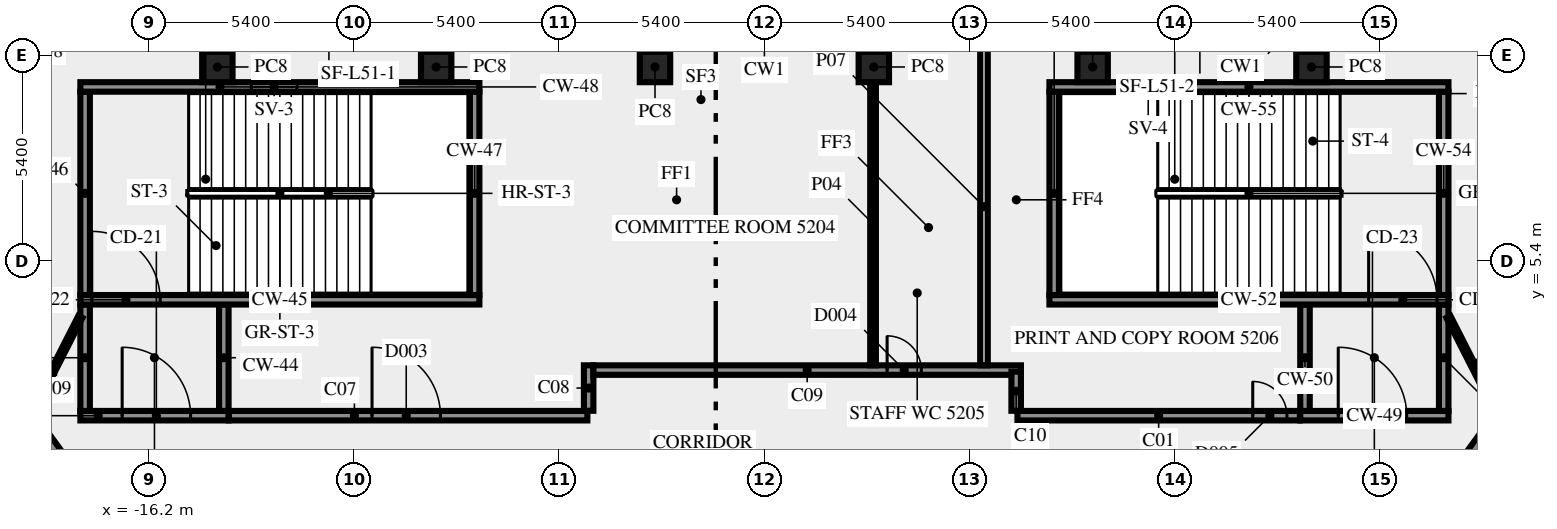
"""IFC4 building model, lengths in metres.
Left out: names, types, materials, properties, quantities, classifications, styles, units other than length and angle.
Written with IfcOpenShell. Run it as: python <this file> out.ifc"""

import sys

from ifc_helpers import new_model, si_unit, direction, frame, frame_2d, origin, origin_2d, place, context, subcontext, project, spatial, rectangle, extrude, element, fill, save


model = new_model("IFC4")
c1 = context("Model", 3, precision=1e-05, world=origin(), true_north=direction((0.0, 1.0)))
c2 = subcontext(c1, "Body", "Model", "MODEL_VIEW")
j1 = project(units=[si_unit("LENGTHUNIT", "METRE"), si_unit("PLANEANGLEUNIT", "RADIAN")], contexts=[c1])
p1 = place(None, origin())
s1 = spatial("IfcSite", under=j1, at=p1, CompositionType="ELEMENT")
p2 = place(p1, origin())
s2 = spatial("IfcBuilding", under=s1, at=p2, CompositionType="ELEMENT")
p3 = place(p2, frame((0.0, 0.0, 222.0)))
s3 = spatial("IfcBuildingStorey", under=s2, at=p3, CompositionType="ELEMENT", Elevation=222.0)
for number, where, z_axis, x_axis in (
    (1, (14.395, 10.5, 0.0), (0.0, 0.0, 1.0), (-1.0, 0.0, 0.0)),
    (2, (8.637, 10.5, 0.0), (0.0, 0.0, 1.0), (-1.0, 0.0, 0.0)),
    (3, (2.879, 10.5, 0.0), (0.0, 0.0, 1.0), (-1.0, 0.0, 0.0)),
    (4, (-2.879, 10.5, 0.0), (0.0, 0.0, 1.0), (-1.0, 0.0, 0.0)),
    (5, (-8.637, 10.5, 0.0), (0.0, 0.0, 1.0), (-1.0, 0.0, 0.0)),
    (6, (-14.395, 10.5, 0.0), (0.0, 0.0, 1.0), (-1.0, 0.0, 0.0)),
):
    element("IfcColumn", number, at=place(p3, frame(where, z_axis=z_axis, x_axis=x_axis)), inside=s3, PredefinedType="COLUMN", context=c2, shape_type="SweptSolid", body=[
        extrude(rectangle(XDim=0.8, YDim=0.8, at=origin_2d()), origin(), (0.0, 0.0, 1.0), 3.65),
    ])
p4 = place(p3, frame((-18.0, 1.325, 0.0), z_axis=(0.0, 0.0, 1.0), x_axis=(1.0, 0.0, 0.0)))
e7 = element("IfcWall", 7, at=p4, inside=s3, PredefinedType="SHEAR", context=c2, shape_type="SweptSolid", body=[
    extrude(rectangle(XDim=3.9, YDim=0.25, at=frame_2d((1.95, 0.0))), origin(), (0.0, 0.0, 1.0), 3.65),
])
p5 = place(p4, frame((1.1, 0.0, 0.0)))
e8 = element("IfcOpeningElement", 8, at=p5, cuts=e7, PredefinedType="OPENING", context=c2, shape_type="SweptSolid", body=[
    extrude(rectangle(XDim=1.8, YDim=2.1, at=frame_2d((0.9, 1.05))), frame((0.0, 0.135, 0.0), z_axis=(0.0, -1.0, 0.0), x_axis=(1.0, 0.0, 0.0)), (0.0, 0.0, 1.0), 0.27),
])
for number, where, z_axis, x_axis in (
    (9, (-17.875, 1.45, 0.0), (0.0, 0.0, 1.0), (0.0, 1.0, 0.0)),
    (10, (-14.225, 1.45, 0.0), (0.0, 0.0, 1.0), (0.0, 1.0, 0.0)),
):
    element("IfcWall", number, at=place(p3, frame(where, z_axis=z_axis, x_axis=x_axis)), inside=s3, PredefinedType="SHEAR", context=c2, shape_type="SweptSolid", body=[
        extrude(rectangle(XDim=2.8, YDim=0.25, at=frame_2d((1.4, 0.0))), origin(), (0.0, 0.0, 1.0), 3.65),
    ])
p6 = place(p3, frame((-18.0, 4.375, 0.0), z_axis=(0.0, 0.0, 1.0), x_axis=(1.0, 0.0, 0.0)))
e11 = element("IfcWall", 11, at=p6, inside=s3, PredefinedType="SHEAR", context=c2, shape_type="SweptSolid", body=[
    extrude(rectangle(XDim=10.5, YDim=0.25, at=frame_2d((5.25, 0.0))), origin(), (0.0, 0.0, 1.0), 3.65),
])
p7 = place(p6, frame((0.3, 0.0, 0.0)))
e12 = element("IfcOpeningElement", 12, at=p7, cuts=e11, PredefinedType="OPENING", context=c2, shape_type="SweptSolid", body=[
    extrude(rectangle(XDim=1.8, YDim=2.1, at=frame_2d((0.9, 1.05))), frame((0.0, 0.135, 0.0), z_axis=(0.0, -1.0, 0.0), x_axis=(1.0, 0.0, 0.0)), (0.0, 0.0, 1.0), 0.27),
])
for number, where, z_axis, x_axis in (
    (13, (-17.875, 4.5, 0.0), (0.0, 0.0, 1.0), (0.0, 1.0, 0.0)),
    (14, (-7.625, 4.5, 0.0), (0.0, 0.0, 1.0), (0.0, 1.0, 0.0)),
):
    element("IfcWall", number, at=place(p3, frame(where, z_axis=z_axis, x_axis=x_axis)), inside=s3, PredefinedType="SHEAR", context=c2, shape_type="SweptSolid", body=[
        extrude(rectangle(XDim=5.35, YDim=0.25, at=frame_2d((2.675, 0.0))), origin(), (0.0, 0.0, 1.0), 3.65),
    ])
p8 = place(p3, frame((-18.0, 9.975, 0.0), z_axis=(0.0, 0.0, 1.0), x_axis=(1.0, 0.0, 0.0)))
e15 = element("IfcWall", 15, at=p8, inside=s3, PredefinedType="SHEAR", context=c2, shape_type="SweptSolid", body=[
    extrude(rectangle(XDim=10.5, YDim=0.25, at=frame_2d((5.25, 0.0))), origin(), (0.0, 0.0, 1.0), 3.65),
])
p9 = place(p8, frame((4.5, 0.0, 1.0)))
e16 = element("IfcOpeningElement", 16, at=p9, cuts=e15, PredefinedType="OPENING", context=c2, shape_type="SweptSolid", body=[
    extrude(rectangle(XDim=1.2, YDim=1.2, at=frame_2d((0.6, 0.6))), frame((0.0, 0.135, 0.0), z_axis=(0.0, -1.0, 0.0), x_axis=(1.0, 0.0, 0.0)), (0.0, 0.0, 1.0), 0.27),
])
p10 = place(p3, frame((14.1, 1.325, 0.0), z_axis=(0.0, 0.0, 1.0), x_axis=(1.0, 0.0, 0.0)))
e17 = element("IfcWall", 17, at=p10, inside=s3, PredefinedType="SHEAR", context=c2, shape_type="SweptSolid", body=[
    extrude(rectangle(XDim=3.9, YDim=0.25, at=frame_2d((1.95, 0.0))), origin(), (0.0, 0.0, 1.0), 3.65),
])
p11 = place(p10, frame((1.0, 0.0, 0.0)))
e18 = element("IfcOpeningElement", 18, at=p11, cuts=e17, PredefinedType="OPENING", context=c2, shape_type="SweptSolid", body=[
    extrude(rectangle(XDim=1.8, YDim=2.1, at=frame_2d((0.9, 1.05))), frame((0.0, 0.135, 0.0), z_axis=(0.0, -1.0, 0.0), x_axis=(1.0, 0.0, 0.0)), (0.0, 0.0, 1.0), 0.27),
])
for number, where, z_axis, x_axis in (
    (19, (14.225, 1.45, 0.0), (0.0, 0.0, 1.0), (0.0, 1.0, 0.0)),
    (20, (17.875, 1.45, 0.0), (0.0, 0.0, 1.0), (0.0, 1.0, 0.0)),
):
    element("IfcWall", number, at=place(p3, frame(where, z_axis=z_axis, x_axis=x_axis)), inside=s3, PredefinedType="SHEAR", context=c2, shape_type="SweptSolid", body=[
        extrude(rectangle(XDim=2.8, YDim=0.25, at=frame_2d((1.4, 0.0))), origin(), (0.0, 0.0, 1.0), 3.65),
    ])
p12 = place(p3, frame((7.5, 4.375, 0.0), z_axis=(0.0, 0.0, 1.0), x_axis=(1.0, 0.0, 0.0)))
e21 = element("IfcWall", 21, at=p12, inside=s3, PredefinedType="SHEAR", context=c2, shape_type="SweptSolid", body=[
    extrude(rectangle(XDim=10.5, YDim=0.25, at=frame_2d((5.25, 0.0))), origin(), (0.0, 0.0, 1.0), 3.65),
])
p13 = place(p12, frame((8.4, 0.0, 0.0)))
e22 = element("IfcOpeningElement", 22, at=p13, cuts=e21, PredefinedType="OPENING", context=c2, shape_type="SweptSolid", body=[
    extrude(rectangle(XDim=1.8, YDim=2.1, at=frame_2d((0.9, 1.05))), frame((0.0, 0.135, 0.0), z_axis=(0.0, -1.0, 0.0), x_axis=(1.0, 0.0, 0.0)), (0.0, 0.0, 1.0), 0.27),
])
for number, where, z_axis, x_axis in (
    (23, (7.625, 4.5, 0.0), (0.0, 0.0, 1.0), (0.0, 1.0, 0.0)),
    (24, (17.875, 4.5, 0.0), (0.0, 0.0, 1.0), (0.0, 1.0, 0.0)),
):
    element("IfcWall", number, at=place(p3, frame(where, z_axis=z_axis, x_axis=x_axis)), inside=s3, PredefinedType="SHEAR", context=c2, shape_type="SweptSolid", body=[
        extrude(rectangle(XDim=5.35, YDim=0.25, at=frame_2d((2.675, 0.0))), origin(), (0.0, 0.0, 1.0), 3.65),
    ])
p14 = place(p3, frame((7.5, 9.975, 0.0), z_axis=(0.0, 0.0, 1.0), x_axis=(1.0, 0.0, 0.0)))
e25 = element("IfcWall", 25, at=p14, inside=s3, PredefinedType="SHEAR", context=c2, shape_type="SweptSolid", body=[
    extrude(rectangle(XDim=10.5, YDim=0.25, at=frame_2d((5.25, 0.0))), origin(), (0.0, 0.0, 1.0), 3.65),
])
p15 = place(p14, frame((2.0, 0.0, 1.0)))
e26 = element("IfcOpeningElement", 26, at=p15, cuts=e25, PredefinedType="OPENING", context=c2, shape_type="SweptSolid", body=[
    extrude(rectangle(XDim=1.2, YDim=1.2, at=frame_2d((0.6, 0.6))), frame((0.0, 0.135, 0.0), z_axis=(0.0, -1.0, 0.0), x_axis=(1.0, 0.0, 0.0)), (0.0, 0.0, 1.0), 0.27),
])
p16 = place(p3, frame((6.659, 1.325, 0.0), z_axis=(0.0, 0.0, 1.0), x_axis=(1.0, 0.0, 0.0)))
e27 = element("IfcWall", 27, at=p16, inside=s3, PredefinedType="SOLIDWALL", context=c2, shape_type="SweptSolid", body=[
    extrude(rectangle(XDim=7.431, YDim=0.25, at=frame_2d((3.716, 0.0))), origin(), (0.0, 0.0, 1.0), 3.65),
])
p17 = place(p16, frame((6.191, 0.0, 0.0)))
e28 = element("IfcOpeningElement", 28, at=p17, cuts=e27, PredefinedType="OPENING", context=c2, shape_type="SweptSolid", body=[
    extrude(rectangle(XDim=0.9, YDim=2.1, at=frame_2d((0.45, 1.05))), frame((0.0, 0.135, 0.0), z_axis=(0.0, -1.0, 0.0), x_axis=(1.0, 0.0, 0.0)), (0.0, 0.0, 1.0), 0.27),
])
p18 = place(p3, frame((17.545, -1.125, 0.0), z_axis=(0.0, 0.0, 1.0), x_axis=(0.587787966774, 0.809015022181, 0.0)))
e29 = element("IfcWall", 29, at=p18, inside=s3, PredefinedType="SOLIDWALL", context=c2, shape_type="SweptSolid", body=[
    extrude(rectangle(XDim=23.345, YDim=0.25, at=frame_2d((11.672, 0.0))), origin(), (0.0, 0.0, 1.0), 3.65),
])
p19 = place(p18, frame((3.441, 0.0, 0.0)))
e30 = element("IfcOpeningElement", 30, at=p19, cuts=e29, PredefinedType="OPENING", context=c2, shape_type="SweptSolid", body=[
    extrude(rectangle(XDim=0.9, YDim=2.1, at=frame_2d((0.45, 1.05))), frame((0.0, 0.135, 0.0), z_axis=(0.0, -1.0, 0.0), x_axis=(1.0, 0.0, 0.0)), (0.0, 0.0, 1.0), 0.27),
])
p20 = place(p3, frame((-31.918, 18.658, 0.0), z_axis=(0.0, 0.0, 1.0), x_axis=(0.587788731405, -0.80901446664, 0.0)))
e31 = element("IfcWall", 31, at=p20, inside=s3, PredefinedType="SOLIDWALL", context=c2, shape_type="SweptSolid", body=[
    extrude(rectangle(XDim=24.453, YDim=0.25, at=frame_2d((12.227, 0.0))), origin(), (0.0, 0.0, 1.0), 3.65),
])
p21 = place(p20, frame((8.395, 0.0, 0.0)))
e32 = element("IfcOpeningElement", 32, at=p21, cuts=e31, PredefinedType="OPENING", context=c2, shape_type="SweptSolid", body=[
    extrude(rectangle(XDim=1.0, YDim=2.1, at=frame_2d((0.5, 1.05))), frame((0.0, 0.135, 0.0), z_axis=(0.0, -1.0, 0.0), x_axis=(1.0, 0.0, 0.0)), (0.0, 0.0, 1.0), 0.27),
])
p22 = place(p20, frame((10.095, 0.0, 0.0)))
e33 = element("IfcOpeningElement", 33, at=p22, cuts=e31, PredefinedType="OPENING", context=c2, shape_type="SweptSolid", body=[
    extrude(rectangle(XDim=0.9, YDim=2.1, at=frame_2d((0.45, 1.05))), frame((0.0, 0.135, 0.0), z_axis=(0.0, -1.0, 0.0), x_axis=(1.0, 0.0, 0.0)), (0.0, 0.0, 1.0), 0.27),
])
p23 = place(p3, frame((-14.09, 1.325, 0.0), z_axis=(0.0, 0.0, 1.0), x_axis=(1.0, 0.0, 0.0)))
e34 = element("IfcWall", 34, at=p23, inside=s3, PredefinedType="SOLIDWALL", context=c2, shape_type="SweptSolid", body=[
    extrude(rectangle(XDim=9.431, YDim=0.25, at=frame_2d((4.716, 0.0))), origin(), (0.0, 0.0, 1.0), 3.65),
])
p24 = place(p23, frame((3.765, 0.0, 0.0)))
e35 = element("IfcOpeningElement", 35, at=p24, cuts=e34, PredefinedType="OPENING", context=c2, shape_type="SweptSolid", body=[
    extrude(rectangle(XDim=1.8, YDim=2.1, at=frame_2d((0.9, 1.05))), frame((0.0, 0.135, 0.0), z_axis=(0.0, -1.0, 0.0), x_axis=(1.0, 0.0, 0.0)), (0.0, 0.0, 1.0), 0.27),
])
p25 = place(p3, frame((-4.625, 1.454, 0.0), z_axis=(0.0, 0.0, 1.0), x_axis=(0.0, 1.0, 0.0)))
e36 = element("IfcWall", 36, at=p25, inside=s3, PredefinedType="SOLIDWALL", context=c2, shape_type="SweptSolid", body=[
    extrude(rectangle(XDim=1.196, YDim=0.25, at=frame_2d((0.598, 0.0))), origin(), (0.0, 0.0, 1.0), 3.65),
])
p26 = place(p3, frame((-4.5, 2.525, 0.0), z_axis=(0.0, 0.0, 1.0), x_axis=(1.0, 0.0, 0.0)))
e37 = element("IfcWall", 37, at=p26, inside=s3, PredefinedType="SOLIDWALL", context=c2, shape_type="SweptSolid", body=[
    extrude(rectangle(XDim=11.25, YDim=0.25, at=frame_2d((5.625, 0.0))), origin(), (0.0, 0.0, 1.0), 3.65),
])
p27 = place(p26, frame((7.729, 0.0, 0.0)))
e38 = element("IfcOpeningElement", 38, at=p27, cuts=e37, PredefinedType="OPENING", context=c2, shape_type="SweptSolid", body=[
    extrude(rectangle(XDim=0.9, YDim=2.1, at=frame_2d((0.45, 1.05))), frame((0.0, 0.135, 0.0), z_axis=(0.0, -1.0, 0.0), x_axis=(1.0, 0.0, 0.0)), (0.0, 0.0, 1.0), 0.27),
])
p28 = place(p3, frame((6.625, 2.484, 0.0), z_axis=(0.0, 0.0, 1.0), x_axis=(0.0, -1.0, 0.0)))
e39 = element("IfcWall", 39, at=p28, inside=s3, PredefinedType="SOLIDWALL", context=c2, shape_type="SweptSolid", body=[
    extrude(rectangle(XDim=1.03, YDim=0.25, at=frame_2d((0.515, 0.0))), origin(), (0.0, 0.0, 1.0), 3.65),
])
p29 = place(p3, frame((2.859, 2.65, 0.0), z_axis=(0.0, 0.0, 1.0), x_axis=(0.0, 1.0, 0.0)))
e40 = element("IfcWall", 40, at=p29, inside=s3, PredefinedType="PARTITIONING", context=c2, shape_type="SweptSolid", body=[
    extrude(rectangle(XDim=7.445, YDim=0.15, at=frame_2d((3.723, 0.0))), origin(), (0.0, 0.0, 1.0), 3.65),
])
p30 = place(p3, frame((-26.089, 10.848, 0.0), z_axis=(0.0, 0.0, 1.0), x_axis=(0.807661302092, 0.589646691759, 0.0)))
e41 = element("IfcWall", 41, at=p30, inside=s3, PredefinedType="PARTITIONING", context=c2, shape_type="SweptSolid", body=[
    extrude(rectangle(XDim=9.55, YDim=0.12, at=frame_2d((4.775, 0.0))), origin(), (0.0, 0.0, 1.0), 2.85),
])
p31 = place(p3, frame((5.778, 11.0, 0.0), z_axis=(0.0, 0.0, 1.0), x_axis=(0.0, -1.0, 0.0)))
e42 = element("IfcWall", 42, at=p31, inside=s3, PredefinedType="SOLIDWALL", context=c2, shape_type="SweptSolid", body=[
    extrude(rectangle(XDim=8.35, YDim=0.2, at=frame_2d((4.175, 0.0))), origin(), (0.0, 0.0, 1.0), 2.85),
])
for number, where, z_axis, x_axis in (
    (43, (18.0, 3.925, 0.0), (0.0, 0.0, 1.0), (0.454, -0.891, 0.0)),
    (44, (-19.261, 1.45, 0.0), (0.0, 0.0, 1.0), (0.454, 0.891, 0.0)),
):
    element("IfcWall", number, at=place(p3, frame(where, z_axis=z_axis, x_axis=x_axis)), inside=s3, PredefinedType="PARTITIONING", context=c2, shape_type="SweptSolid", body=[
        extrude(rectangle(XDim=2.778, YDim=0.12, at=frame_2d((1.389, 0.0))), origin(), (0.0, 0.0, 1.0), 3.65),
    ])
p32 = place(p5, origin())
e45 = element("IfcDoor", 45, at=p32, inside=s3, OperationType="DOUBLE_DOOR_SINGLE_SWING", PredefinedType="DOOR", context=c2, shape_type="SweptSolid", body=[
    extrude(rectangle(XDim=1.8, YDim=2.1, at=frame_2d((0.9, 1.05))), frame((0.0, 0.025, 0.0), z_axis=(0.0, -1.0, 0.0), x_axis=(1.0, 0.0, 0.0)), (0.0, 0.0, 1.0), 0.05),
])
fill(e8, e45)
p33 = place(p7, origin())
e46 = element("IfcDoor", 46, at=p33, inside=s3, OperationType="DOUBLE_DOOR_SINGLE_SWING", PredefinedType="DOOR", context=c2, shape_type="SweptSolid", body=[
    extrude(rectangle(XDim=1.8, YDim=2.1, at=frame_2d((0.9, 1.05))), frame((0.0, 0.025, 0.0), z_axis=(0.0, -1.0, 0.0), x_axis=(1.0, 0.0, 0.0)), (0.0, 0.0, 1.0), 0.05),
])
fill(e12, e46)
p34 = place(p9, origin())
e47 = element("IfcWindow", 47, at=p34, inside=s3, PartitioningType="SINGLE_PANEL", PredefinedType="WINDOW", context=c2, shape_type="SweptSolid", body=[
    extrude(rectangle(XDim=1.2, YDim=1.2, at=frame_2d((0.6, 0.6))), frame((0.0, 0.03, 0.0), z_axis=(0.0, -1.0, 0.0), x_axis=(1.0, 0.0, 0.0)), (0.0, 0.0, 1.0), 0.06),
])
fill(e16, e47)
p35 = place(p11, origin())
e48 = element("IfcDoor", 48, at=p35, inside=s3, OperationType="DOUBLE_DOOR_SINGLE_SWING", PredefinedType="DOOR", context=c2, shape_type="SweptSolid", body=[
    extrude(rectangle(XDim=1.8, YDim=2.1, at=frame_2d((0.9, 1.05))), frame((0.0, 0.025, 0.0), z_axis=(0.0, -1.0, 0.0), x_axis=(1.0, 0.0, 0.0)), (0.0, 0.0, 1.0), 0.05),
])
fill(e18, e48)
p36 = place(p13, origin())
e49 = element("IfcDoor", 49, at=p36, inside=s3, OperationType="DOUBLE_DOOR_SINGLE_SWING", PredefinedType="DOOR", context=c2, shape_type="SweptSolid", body=[
    extrude(rectangle(XDim=1.8, YDim=2.1, at=frame_2d((0.9, 1.05))), frame((0.0, 0.025, 0.0), z_axis=(0.0, -1.0, 0.0), x_axis=(1.0, 0.0, 0.0)), (0.0, 0.0, 1.0), 0.05),
])
fill(e22, e49)
p37 = place(p15, origin())
e50 = element("IfcWindow", 50, at=p37, inside=s3, PartitioningType="SINGLE_PANEL", PredefinedType="WINDOW", context=c2, shape_type="SweptSolid", body=[
    extrude(rectangle(XDim=1.2, YDim=1.2, at=frame_2d((0.6, 0.6))), frame((0.0, 0.03, 0.0), z_axis=(0.0, -1.0, 0.0), x_axis=(1.0, 0.0, 0.0)), (0.0, 0.0, 1.0), 0.06),
])
fill(e26, e50)
p38 = place(p24, origin())
e51 = element("IfcDoor", 51, at=p38, inside=s3, OperationType="DOUBLE_DOOR_SINGLE_SWING", PredefinedType="DOOR", context=c2, shape_type="SweptSolid", body=[
    extrude(rectangle(XDim=1.8, YDim=2.1, at=frame_2d((0.9, 1.05))), frame((0.0, 0.025, 0.0), z_axis=(0.0, -1.0, 0.0), x_axis=(1.0, 0.0, 0.0)), (0.0, 0.0, 1.0), 0.05),
])
fill(e35, e51)
p39 = place(p17, origin())
e52 = element("IfcDoor", 52, at=p39, inside=s3, OperationType="SINGLE_SWING_RIGHT", PredefinedType="DOOR", context=c2, shape_type="SweptSolid", body=[
    extrude(rectangle(XDim=0.9, YDim=2.1, at=frame_2d((0.45, 1.05))), frame((0.0, 0.025, 0.0), z_axis=(0.0, -1.0, 0.0), x_axis=(1.0, 0.0, 0.0)), (0.0, 0.0, 1.0), 0.05),
])
fill(e28, e52)
p40 = place(p27, origin())
e53 = element("IfcDoor", 53, at=p40, inside=s3, OperationType="SINGLE_SWING_LEFT", PredefinedType="DOOR", context=c2, shape_type="SweptSolid", body=[
    extrude(rectangle(XDim=0.9, YDim=2.1, at=frame_2d((0.45, 1.05))), frame((0.0, 0.025, 0.0), z_axis=(0.0, -1.0, 0.0), x_axis=(1.0, 0.0, 0.0)), (0.0, 0.0, 1.0), 0.05),
])
fill(e38, e53)
save(model, sys.argv[1])
